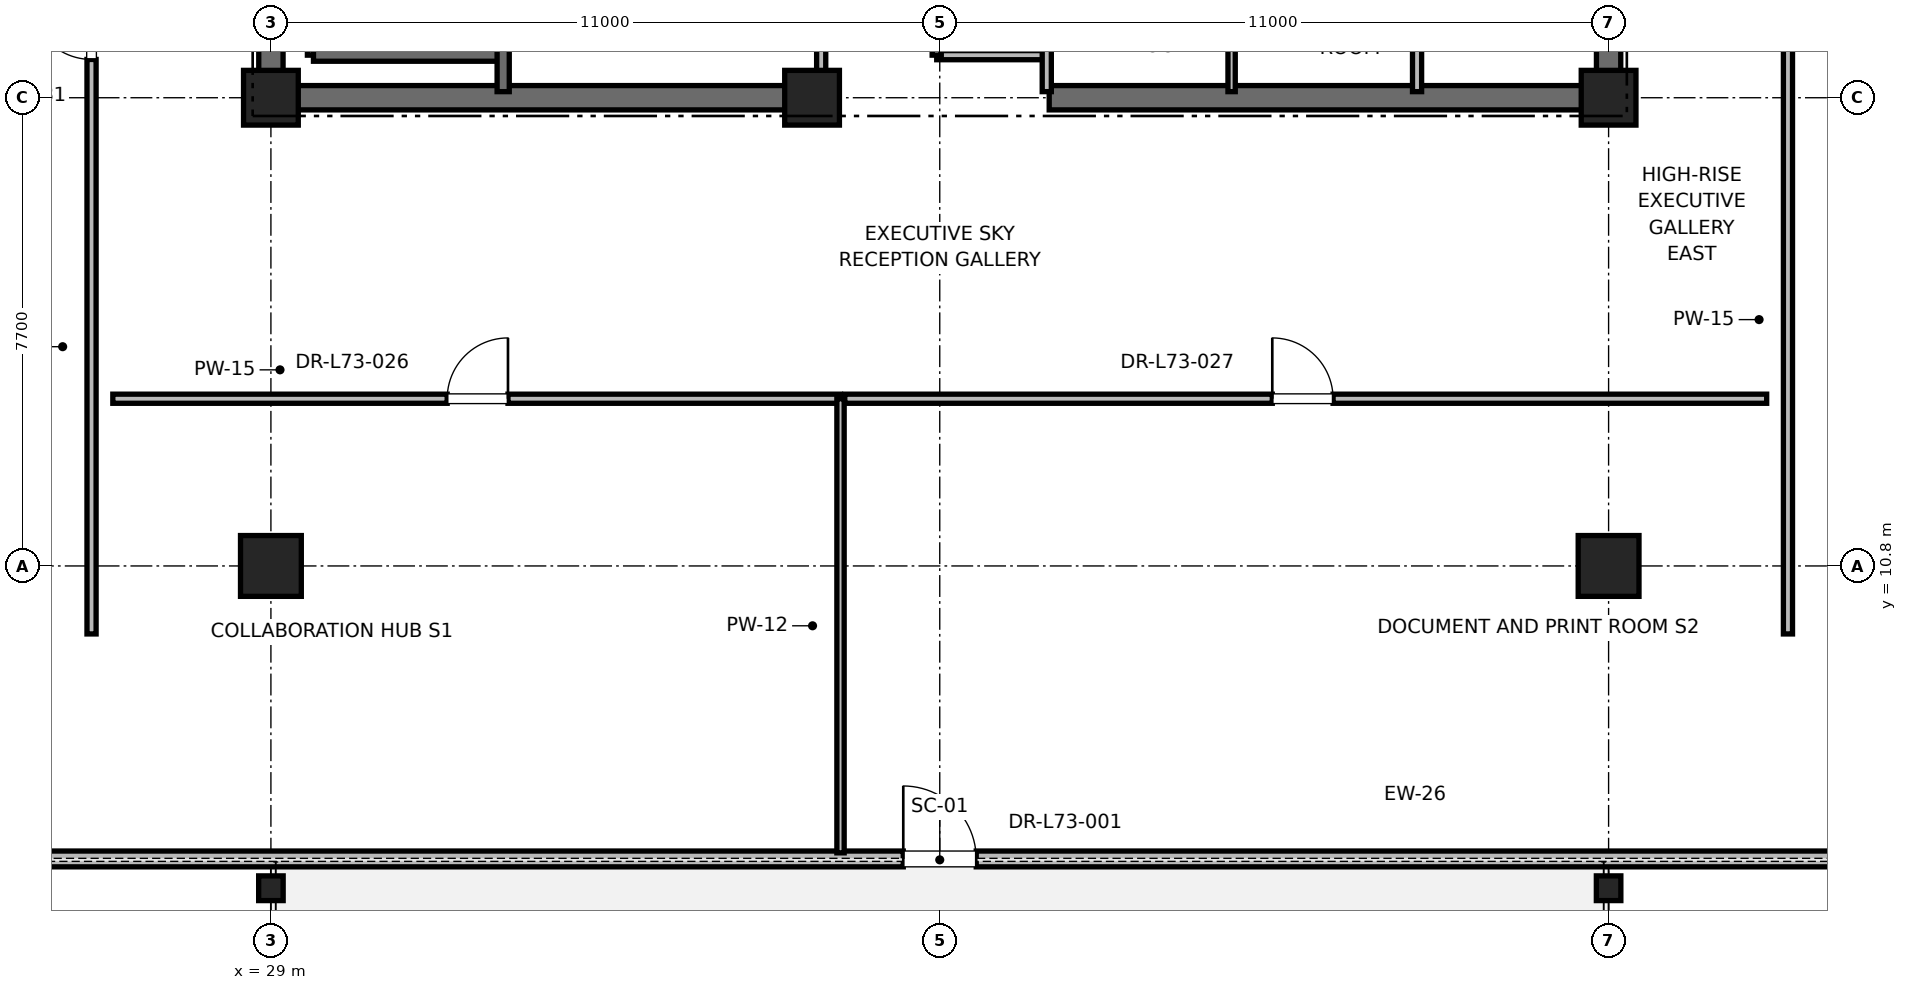
"""IFC4 building model, lengths in metres.
Left out: names, types, materials, properties, quantities, classifications, styles, units other than length and angle.
Written with IfcOpenShell. Run it as: python <this file> out.ifc"""

import sys

from ifc_helpers import new_model, si_unit, direction, frame, frame_2d, origin, origin_2d, place, context, subcontext, project, spatial, rectangle, i_section, extrude, element, fill, save


model = new_model("IFC4")
c1 = context("Model", 3, precision=1e-05, world=origin(), true_north=direction((0.0, 1.0)))
c2 = subcontext(c1, "Body", "Model", "MODEL_VIEW")
j1 = project(units=[si_unit("LENGTHUNIT", "METRE"), si_unit("PLANEANGLEUNIT", "RADIAN")], contexts=[c1])
p1 = place(None, origin())
s1 = spatial("IfcSite", under=j1, at=p1, CompositionType="ELEMENT")
p2 = place(p1, origin())
s2 = spatial("IfcBuilding", under=s1, at=p2, CompositionType="ELEMENT")
p3 = place(p2, frame((0.0, 0.0, 314.8)))
s3 = spatial("IfcBuildingStorey", under=s2, at=p3, CompositionType="ELEMENT", Elevation=314.8)
for number, where, z_axis, x_axis in (
    (1, (29.0, 10.8, 0.0), (0.0, 0.0, 1.0), (1.0, 0.0, 0.0)),
    (2, (51.0, 10.8, 0.0), (0.0, 0.0, 1.0), (1.0, 0.0, 0.0)),
):
    element("IfcColumn", number, at=place(p3, frame(where, z_axis=z_axis, x_axis=x_axis)), inside=s3, PredefinedType="COLUMN", context=c2, shape_type="SweptSolid", body=[
        extrude(rectangle(XDim=1.0, YDim=1.0, at=origin_2d()), origin(), (0.0, 0.0, 1.0), 4.0),
    ])
for number, where, z_axis, x_axis in (
    (3, (29.0, 5.5, 0.0), (0.0, 0.0, 1.0), (1.0, 0.0, 0.0)),
    (4, (51.0, 5.5, 0.0), (0.0, 0.0, 1.0), (1.0, 0.0, 0.0)),
):
    element("IfcColumn", number, at=place(p3, frame(where, z_axis=z_axis, x_axis=x_axis)), inside=s3, PredefinedType="COLUMN", context=c2, shape_type="SweptSolid", body=[
        extrude(i_section(OverallWidth=0.403, OverallDepth=0.406, WebThickness=0.027, FlangeThickness=0.043, FilletRadius=0.015, at=origin_2d()), origin(), (0.0, 0.0, 1.0), 4.0),
    ])
for number, where, z_axis, x_axis in (
    (5, (29.0, 18.5, 0.0), (0.0, 0.0, 1.0), (1.0, 0.0, 0.0)),
    (6, (51.0, 18.5, 0.0), (0.0, 0.0, 1.0), (1.0, 0.0, 0.0)),
    (7, (37.9, 18.5, 0.0), (0.0, 0.0, 1.0), (1.0, 0.0, 0.0)),
):
    element("IfcColumn", number, at=place(p3, frame(where, z_axis=z_axis, x_axis=x_axis)), inside=s3, PredefinedType="PILASTER", context=c2, shape_type="SweptSolid", body=[
        extrude(rectangle(XDim=0.9, YDim=0.9, at=origin_2d()), origin(), (0.0, 0.0, 1.0), 4.0),
    ])
for number, where, z_axis, x_axis in (
    (8, (29.0, 18.5, 0.0), (0.0, 0.0, 1.0), (1.0, 0.0, 0.0)),
    (9, (41.8, 18.5, 0.0), (0.0, 0.0, 1.0), (1.0, 0.0, 0.0)),
):
    element("IfcWall", number, at=place(p3, frame(where, z_axis=z_axis, x_axis=x_axis)), inside=s3, PredefinedType="SHEAR", context=c2, shape_type="SweptSolid", body=[
        extrude(rectangle(XDim=9.2, YDim=0.4, at=frame_2d((4.6, 0.0))), origin(), (0.0, 0.0, 1.0), 3.785),
    ])
p4 = place(p3, frame((29.0, 18.5, 0.0), z_axis=(0.0, 0.0, 1.0), x_axis=(0.0, 1.0, 0.0)))
e10 = element("IfcWall", 10, at=p4, inside=s3, PredefinedType="SHEAR", context=c2, shape_type="SweptSolid", body=[
    extrude(rectangle(XDim=8.8, YDim=0.4, at=frame_2d((4.4, 0.0))), origin(), (0.0, 0.0, 1.0), 3.785),
])
p5 = place(p3, frame((51.0, 18.5, 0.0), z_axis=(0.0, 0.0, 1.0), x_axis=(0.0, 1.0, 0.0)))
e11 = element("IfcWall", 11, at=p5, inside=s3, PredefinedType="SHEAR", context=c2, shape_type="SweptSolid", body=[
    extrude(rectangle(XDim=5.8, YDim=0.4, at=frame_2d((2.9, 0.0))), origin(), (0.0, 0.0, 1.0), 3.785),
])
p6 = place(p3, frame((19.164, 5.982, 0.0), z_axis=(0.0, 0.0, 1.0), x_axis=(1.0, 0.0, 0.0)))
e12 = element("IfcWall", 12, at=p6, inside=s3, PredefinedType="PARAPET", context=c2, shape_type="SweptSolid", body=[
    extrude(rectangle(XDim=41.673, YDim=0.26, at=frame_2d((20.836, 0.0))), origin(), (0.0, 0.0, 1.0), 3.196),
])
p7 = place(p6, frame((4.2, 0.0, 0.85)))
e13 = element("IfcOpeningElement", 13, at=p7, cuts=e12, PredefinedType="OPENING", context=c2, shape_type="SweptSolid", body=[
    extrude(rectangle(XDim=1.6, YDim=2.1, at=frame_2d((0.8, 1.05))), frame((0.0, 0.13, 0.0), z_axis=(0.0, -1.0, 0.0), x_axis=(1.0, 0.0, 0.0)), (0.0, 0.0, 1.0), 0.26),
])
p8 = place(p6, frame((20.236, 0.0, 0.0)))
e14 = element("IfcOpeningElement", 14, at=p8, cuts=e12, PredefinedType="OPENING", context=c2, shape_type="SweptSolid", body=[
    extrude(rectangle(XDim=1.2, YDim=2.2, at=frame_2d((0.6, 1.1))), frame((0.0, 0.13, 0.0), z_axis=(0.0, -1.0, 0.0), x_axis=(1.0, 0.0, 0.0)), (0.0, 0.0, 1.0), 0.26),
])
p9 = place(p6, frame((35.873, 0.0, 0.85)))
e15 = element("IfcOpeningElement", 15, at=p9, cuts=e12, PredefinedType="OPENING", context=c2, shape_type="SweptSolid", body=[
    extrude(rectangle(XDim=1.6, YDim=2.1, at=frame_2d((0.8, 1.05))), frame((0.0, 0.13, 0.0), z_axis=(0.0, -1.0, 0.0), x_axis=(1.0, 0.0, 0.0)), (0.0, 0.0, 1.0), 0.26),
])
p10 = place(p3, frame((29.7, 19.2, 0.0), z_axis=(0.0, 0.0, 1.0), x_axis=(0.0, 1.0, 0.0)))
e16 = element("IfcWall", 16, at=p10, inside=s3, PredefinedType="SOLIDWALL", context=c2, shape_type="SweptSolid", body=[
    extrude(rectangle(XDim=8.15, YDim=0.2, at=frame_2d((4.075, 0.0))), origin(), (0.0, 0.0, 1.0), 3.785),
])
p11 = place(p3, frame((29.7, 19.2, 0.0), z_axis=(0.0, 0.0, 1.0), x_axis=(1.0, 0.0, 0.0)))
e17 = element("IfcWall", 17, at=p11, inside=s3, PredefinedType="SOLIDWALL", context=c2, shape_type="SweptSolid", body=[
    extrude(rectangle(XDim=3.12, YDim=0.2, at=frame_2d((1.56, 0.0))), origin(), (0.0, 0.0, 1.0), 3.785),
])
p12 = place(p3, frame((32.82, 18.6, 0.0), z_axis=(0.0, 0.0, 1.0), x_axis=(0.0, 1.0, 0.0)))
e18 = element("IfcWall", 18, at=p12, inside=s3, PredefinedType="SOLIDWALL", context=c2, shape_type="SweptSolid", body=[
    extrude(rectangle(XDim=8.78, YDim=0.2, at=frame_2d((4.39, 0.0))), origin(), (0.0, 0.0, 1.0), 3.785),
])
p13 = place(p3, frame((39.95, 19.2, 0.0), z_axis=(0.0, 0.0, 1.0), x_axis=(1.0, 0.0, 0.0)))
e19 = element("IfcWall", 19, at=p13, inside=s3, PredefinedType="PARTITIONING", context=c2, shape_type="SweptSolid", body=[
    extrude(rectangle(XDim=1.81, YDim=0.15, at=frame_2d((0.905, 0.0))), origin(), (0.0, 0.0, 1.0), 2.85),
])
p14 = place(p3, frame((41.76, 18.6, 0.0), z_axis=(0.0, 0.0, 1.0), x_axis=(0.0, 1.0, 0.0)))
e20 = element("IfcWall", 20, at=p14, inside=s3, PredefinedType="PARTITIONING", context=c2, shape_type="SweptSolid", body=[
    extrude(rectangle(XDim=3.6, YDim=0.15, at=frame_2d((1.8, 0.0))), origin(), (0.0, 0.0, 1.0), 2.85),
])
p15 = place(p3, frame((39.95, 19.2, 0.0), z_axis=(0.0, 0.0, 1.0), x_axis=(0.0, 1.0, 0.0)))
e21 = element("IfcWall", 21, at=p15, inside=s3, PredefinedType="PARTITIONING", context=c2, shape_type="SweptSolid", body=[
    extrude(rectangle(XDim=3.0, YDim=0.15, at=frame_2d((1.5, 0.0))), origin(), (0.0, 0.0, 1.0), 2.85),
])
p16 = place(p15, frame((1.05, 0.0, 0.0)))
e22 = element("IfcOpeningElement", 22, at=p16, cuts=e21, PredefinedType="OPENING", context=c2, shape_type="SweptSolid", body=[
    extrude(rectangle(XDim=0.9, YDim=2.1, at=frame_2d((0.45, 1.05))), frame((0.0, 0.075, 0.0), z_axis=(0.0, -1.0, 0.0), x_axis=(1.0, 0.0, 0.0)), (0.0, 0.0, 1.0), 0.15),
])
p17 = place(p3, frame((38.05, 18.6, 0.0), z_axis=(0.0, 0.0, 1.0), x_axis=(0.0, 1.0, 0.0)))
e23 = element("IfcWall", 23, at=p17, inside=s3, PredefinedType="PARTITIONING", context=c2, shape_type="SweptSolid", body=[
    extrude(rectangle(XDim=4.46, YDim=0.15, at=frame_2d((2.23, 0.0))), origin(), (0.0, 0.0, 1.0), 2.85),
])
p18 = place(p17, frame((1.73, 0.0, 0.0)))
e24 = element("IfcOpeningElement", 24, at=p18, cuts=e23, PredefinedType="OPENING", context=c2, shape_type="SweptSolid", body=[
    extrude(rectangle(XDim=1.0, YDim=2.15, at=frame_2d((0.5, 1.075))), frame((0.0, 0.075, 0.0), z_axis=(0.0, -1.0, 0.0), x_axis=(1.0, 0.0, 0.0)), (0.0, 0.0, 1.0), 0.15),
])
p19 = place(p3, frame((47.85, 18.6, 0.0), z_axis=(0.0, 0.0, 1.0), x_axis=(0.0, 1.0, 0.0)))
e25 = element("IfcWall", 25, at=p19, inside=s3, PredefinedType="PARTITIONING", context=c2, shape_type="SweptSolid", body=[
    extrude(rectangle(XDim=2.54, YDim=0.15, at=frame_2d((1.27, 0.0))), origin(), (0.0, 0.0, 1.0), 2.85),
])
p20 = place(p3, frame((44.8, 18.6, 0.0), z_axis=(0.0, 0.0, 1.0), x_axis=(0.0, 1.0, 0.0)))
e26 = element("IfcWall", 26, at=p20, inside=s3, PredefinedType="PARTITIONING", context=c2, shape_type="SweptSolid", body=[
    extrude(rectangle(XDim=3.02, YDim=0.12, at=frame_2d((1.51, 0.0))), origin(), (0.0, 0.0, 1.0), 2.85),
])
p21 = place(p3, frame((26.4, 13.55, 0.0), z_axis=(0.0, 0.0, 1.0), x_axis=(1.0, 0.0, 0.0)))
e27 = element("IfcWall", 27, at=p21, inside=s3, PredefinedType="PARTITIONING", context=c2, shape_type="SweptSolid", body=[
    extrude(rectangle(XDim=11.968, YDim=0.15, at=frame_2d((5.984, 0.0))), origin(), (0.0, 0.0, 1.0), 2.85),
])
p22 = place(p21, frame((5.499, 0.0, 0.0)))
e28 = element("IfcOpeningElement", 28, at=p22, cuts=e27, PredefinedType="OPENING", context=c2, shape_type="SweptSolid", body=[
    extrude(rectangle(XDim=1.0, YDim=2.15, at=frame_2d((0.5, 1.075))), frame((0.0, 0.075, 0.0), z_axis=(0.0, -1.0, 0.0), x_axis=(1.0, 0.0, 0.0)), (0.0, 0.0, 1.0), 0.15),
])
p23 = place(p3, frame((38.368, 6.082, 0.0), z_axis=(0.0, 0.0, 1.0), x_axis=(0.0, 1.0, 0.0)))
e29 = element("IfcWall", 29, at=p23, inside=s3, PredefinedType="PARTITIONING", context=c2, shape_type="SweptSolid", body=[
    extrude(rectangle(XDim=7.468, YDim=0.12, at=frame_2d((3.734, 0.0))), origin(), (0.0, 0.0, 1.0), 2.415),
])
p24 = place(p3, frame((38.438, 13.55, 0.0), z_axis=(0.0, 0.0, 1.0), x_axis=(1.0, 0.0, 0.0)))
e30 = element("IfcWall", 30, at=p24, inside=s3, PredefinedType="PARTITIONING", context=c2, shape_type="SweptSolid", body=[
    extrude(rectangle(XDim=15.162, YDim=0.15, at=frame_2d((7.581, 0.0))), origin(), (0.0, 0.0, 1.0), 2.85),
])
p25 = place(p24, frame((7.031, 0.0, 0.0)))
e31 = element("IfcOpeningElement", 31, at=p25, cuts=e30, PredefinedType="OPENING", context=c2, shape_type="SweptSolid", body=[
    extrude(rectangle(XDim=1.0, YDim=2.15, at=frame_2d((0.5, 1.075))), frame((0.0, 0.075, 0.0), z_axis=(0.0, -1.0, 0.0), x_axis=(1.0, 0.0, 0.0)), (0.0, 0.0, 1.0), 0.15),
])
p26 = place(p3, frame((26.05, 9.682, 0.0), z_axis=(0.0, 0.0, 1.0), x_axis=(0.0, 1.0, 0.0)))
e32 = element("IfcWall", 32, at=p26, inside=s3, PredefinedType="PARTITIONING", context=c2, shape_type="SweptSolid", body=[
    extrude(rectangle(XDim=11.047, YDim=0.15, at=frame_2d((5.523, 0.0))), origin(), (0.0, 0.0, 1.0), 2.85),
])
p27 = place(p26, frame((9.448, 0.0, 0.0)))
e33 = element("IfcOpeningElement", 33, at=p27, cuts=e32, PredefinedType="OPENING", context=c2, shape_type="SweptSolid", body=[
    extrude(rectangle(XDim=1.0, YDim=2.15, at=frame_2d((0.5, 1.075))), frame((0.0, 0.075, 0.0), z_axis=(0.0, -1.0, 0.0), x_axis=(1.0, 0.0, 0.0)), (0.0, 0.0, 1.0), 0.15),
])
p28 = place(p3, frame((53.95, 9.682, 0.0), z_axis=(0.0, 0.0, 1.0), x_axis=(0.0, 1.0, 0.0)))
e34 = element("IfcWall", 34, at=p28, inside=s3, PredefinedType="PARTITIONING", context=c2, shape_type="SweptSolid", body=[
    extrude(rectangle(XDim=12.829, YDim=0.15, at=frame_2d((6.415, 0.0))), origin(), (0.0, 0.0, 1.0), 2.85),
])
p29 = place(p28, frame((10.339, 0.0, 0.0)))
e35 = element("IfcOpeningElement", 35, at=p29, cuts=e34, PredefinedType="OPENING", context=c2, shape_type="SweptSolid", body=[
    extrude(rectangle(XDim=1.0, YDim=2.15, at=frame_2d((0.5, 1.075))), frame((0.0, 0.075, 0.0), z_axis=(0.0, -1.0, 0.0), x_axis=(1.0, 0.0, 0.0)), (0.0, 0.0, 1.0), 0.15),
])
p30 = place(p8, origin())
e36 = element("IfcDoor", 36, at=p30, inside=s3, OperationType="SINGLE_SWING_LEFT", PredefinedType="DOOR", context=c2, shape_type="SweptSolid", body=[
    extrude(rectangle(XDim=1.2, YDim=2.2, at=frame_2d((0.6, 1.1))), frame((0.0, 0.025, 0.0), z_axis=(0.0, -1.0, 0.0), x_axis=(1.0, 0.0, 0.0)), (0.0, 0.0, 1.0), 0.05),
])
fill(e14, e36)
p31 = place(p22, origin())
e37 = element("IfcDoor", 37, at=p31, inside=s3, OperationType="SINGLE_SWING_RIGHT", PredefinedType="DOOR", context=c2, shape_type="SweptSolid", body=[
    extrude(rectangle(XDim=1.0, YDim=2.15, at=frame_2d((0.5, 1.075))), frame((0.0, 0.025, 0.0), z_axis=(0.0, -1.0, 0.0), x_axis=(1.0, 0.0, 0.0)), (0.0, 0.0, 1.0), 0.05),
])
fill(e28, e37)
p32 = place(p25, origin())
e38 = element("IfcDoor", 38, at=p32, inside=s3, OperationType="SINGLE_SWING_LEFT", PredefinedType="DOOR", context=c2, shape_type="SweptSolid", body=[
    extrude(rectangle(XDim=1.0, YDim=2.15, at=frame_2d((0.5, 1.075))), frame((0.0, 0.025, 0.0), z_axis=(0.0, -1.0, 0.0), x_axis=(1.0, 0.0, 0.0)), (0.0, 0.0, 1.0), 0.05),
])
fill(e31, e38)
p33 = place(p27, origin())
e39 = element("IfcDoor", 39, at=p33, inside=s3, OperationType="SINGLE_SWING_RIGHT", PredefinedType="DOOR", context=c2, shape_type="SweptSolid", body=[
    extrude(rectangle(XDim=1.0, YDim=2.15, at=frame_2d((0.5, 1.075))), frame((0.0, 0.025, 0.0), z_axis=(0.0, -1.0, 0.0), x_axis=(1.0, 0.0, 0.0)), (0.0, 0.0, 1.0), 0.05),
])
fill(e33, e39)
save(model, sys.argv[1])
